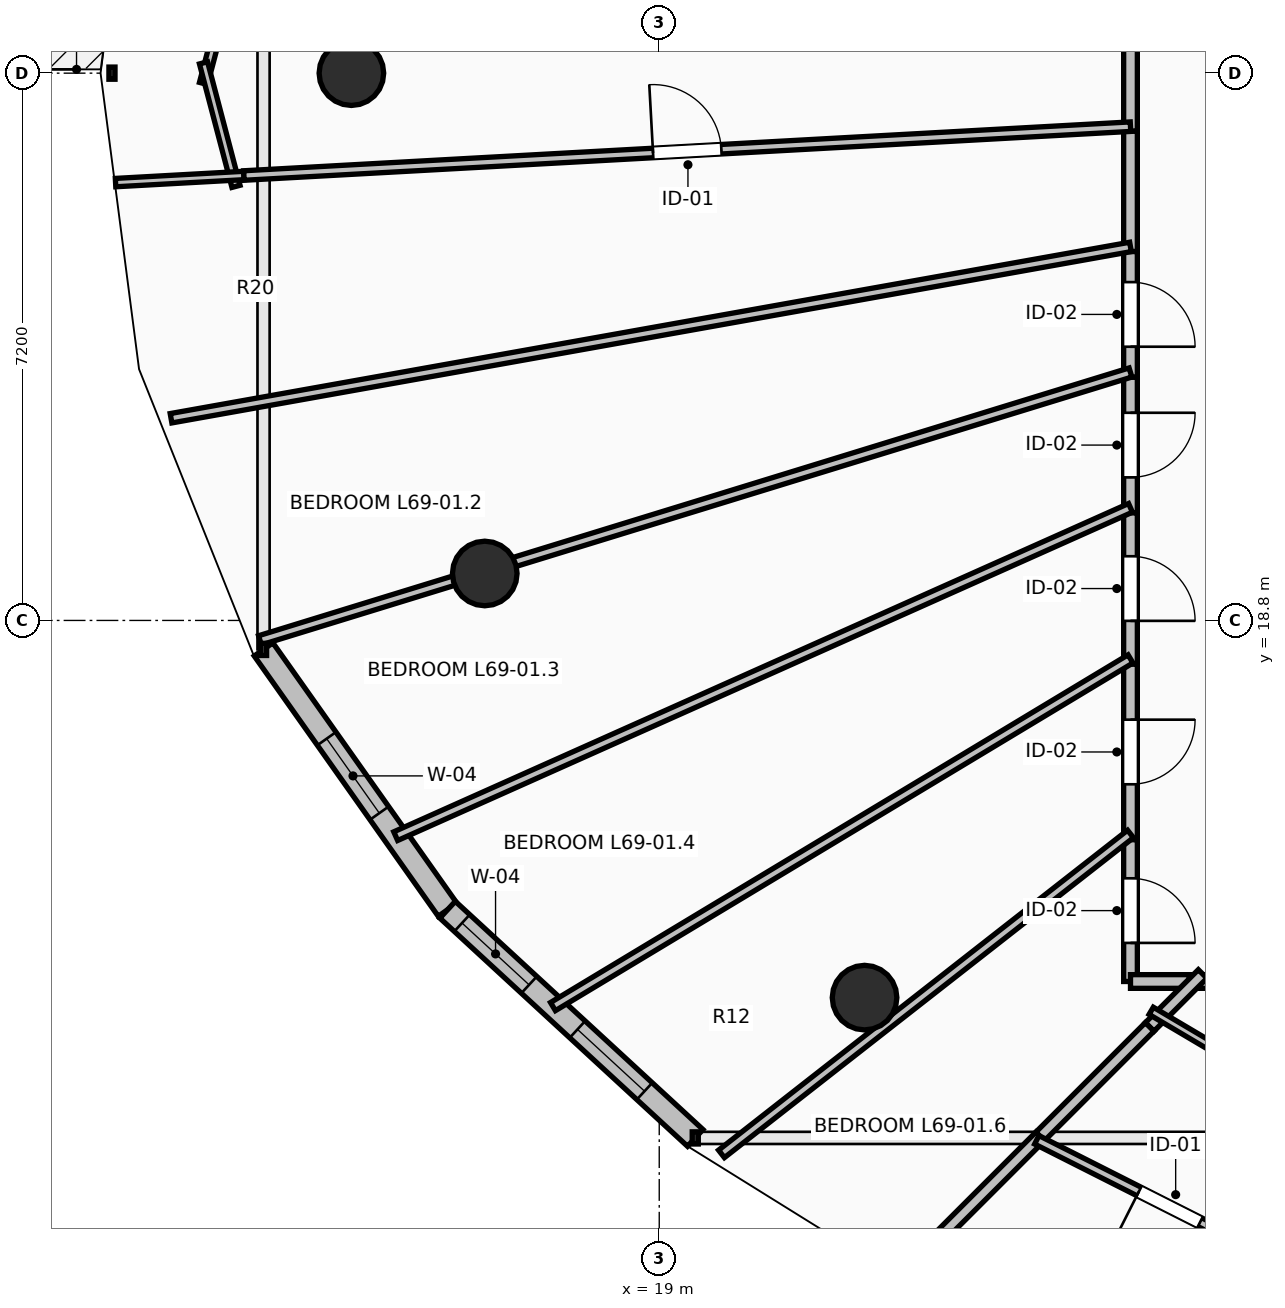
"""IFC4 building model, lengths in metres.
Left out: names, types, materials, properties, quantities, classifications, styles, units other than length and angle.
Written with IfcOpenShell. Run it as: python <this file> out.ifc"""

import sys

from ifc_helpers import new_model, si_unit, direction, frame, frame_2d, origin, origin_2d, place, context, subcontext, project, spatial, rectangle, circle, extrude, element, fill, save


model = new_model("IFC4")
c1 = context("Model", 3, precision=1e-05, world=origin(), true_north=direction((0.0, 1.0)))
c2 = subcontext(c1, "Body", "Model", "MODEL_VIEW")
j1 = project(units=[si_unit("LENGTHUNIT", "METRE"), si_unit("PLANEANGLEUNIT", "RADIAN")], contexts=[c1])
p1 = place(None, origin())
s1 = spatial("IfcSite", under=j1, at=p1, CompositionType="ELEMENT")
p2 = place(p1, origin())
s2 = spatial("IfcBuilding", under=s1, at=p2, CompositionType="ELEMENT")
p3 = place(p2, frame((0.0, 0.0, 255.55)))
s3 = spatial("IfcBuildingStorey", under=s2, at=p3, CompositionType="ELEMENT", Elevation=255.55)
for number, where, z_axis, x_axis in (
    (1, (14.95, 26.0, 0.0), (0.0, 0.0, 1.0), (-1.0, 0.0, 0.0)),
    (2, (16.705, 19.418, 0.0), (0.0, 0.0, 1.0), (-0.924, -0.383, 0.0)),
    (3, (21.701, 13.838, 0.0), (0.0, 0.0, 1.0), (-0.707, -0.707, 0.0)),
):
    element("IfcColumn", number, at=place(p3, frame(where, z_axis=z_axis, x_axis=x_axis)), inside=s3, PredefinedType="COLUMN", context=c2, shape_type="SweptSolid", body=[
        extrude(circle(Radius=0.425, at=origin_2d()), origin(), (0.0, 0.0, 1.0), 3.55),
    ])
p4 = place(p3, frame((13.794, 18.419, 0.0), z_axis=(0.0, 0.0, 1.0), x_axis=(0.577261247247, -0.816559521668, 0.0)))
e4 = element("IfcWall", 4, at=p4, inside=s3, PredefinedType="STANDARD", context=c2, shape_type="SweptSolid", body=[
    extrude(rectangle(XDim=4.194, YDim=0.3, at=frame_2d((2.097, 0.0))), origin(), (0.0, 0.0, 1.0), 3.29),
])
p5 = place(p4, frame((1.438, 0.0, 0.85)))
e5 = element("IfcOpeningElement", 5, at=p5, cuts=e4, PredefinedType="OPENING", context=c2, shape_type="SweptSolid", body=[
    extrude(rectangle(XDim=1.2, YDim=1.95, at=frame_2d((0.6, 0.975))), frame((0.0, 0.165, 0.0), z_axis=(0.0, -1.0, 0.0), x_axis=(1.0, 0.0, 0.0)), (0.0, 0.0, 1.0), 0.33),
])
p6 = place(p3, frame((16.216, 14.994, 0.0), z_axis=(0.0, 0.0, 1.0), x_axis=(0.735445373611, -0.677584018727, 0.0)))
e6 = element("IfcWall", 6, at=p6, inside=s3, PredefinedType="STANDARD", context=c2, shape_type="SweptSolid", body=[
    extrude(rectangle(XDim=4.43, YDim=0.3, at=frame_2d((2.215, 0.0))), origin(), (0.0, 0.0, 1.0), 3.29),
])
p7 = place(p6, frame((0.258, 0.0, 0.85)))
e7 = element("IfcOpeningElement", 7, at=p7, cuts=e6, PredefinedType="OPENING", context=c2, shape_type="SweptSolid", body=[
    extrude(rectangle(XDim=1.2, YDim=1.95, at=frame_2d((0.6, 0.975))), frame((0.0, 0.165, 0.0), z_axis=(0.0, -1.0, 0.0), x_axis=(1.0, 0.0, 0.0)), (0.0, 0.0, 1.0), 0.33),
])
p8 = place(p6, frame((2.323, 0.0, 0.85)))
e8 = element("IfcOpeningElement", 8, at=p8, cuts=e6, PredefinedType="OPENING", context=c2, shape_type="SweptSolid", body=[
    extrude(rectangle(XDim=1.2, YDim=1.95, at=frame_2d((0.6, 0.975))), frame((0.0, 0.165, 0.0), z_axis=(0.0, -1.0, 0.0), x_axis=(1.0, 0.0, 0.0)), (0.0, 0.0, 1.0), 0.33),
])
p9 = place(p3, frame((25.2, 28.599, 0.0), z_axis=(0.0, 0.0, 1.0), x_axis=(0.0, -1.0, 0.0)))
e9 = element("IfcWall", 9, at=p9, inside=s3, PredefinedType="PARTITIONING", context=c2, shape_type="SweptSolid", body=[
    extrude(rectangle(XDim=3.363, YDim=0.18, at=frame_2d((1.682, 0.0))), origin(), (0.0, 0.0, 1.0), 2.482),
])
p10 = place(p9, frame((1.181, 0.0, 0.0)))
e10 = element("IfcOpeningElement", 10, at=p10, cuts=e9, PredefinedType="OPENING", context=c2, shape_type="SweptSolid", body=[
    extrude(rectangle(XDim=1.0, YDim=2.15, at=frame_2d((0.5, 1.075))), frame((0.0, 0.105, 0.0), z_axis=(0.0, -1.0, 0.0), x_axis=(1.0, 0.0, 0.0)), (0.0, 0.0, 1.0), 0.21),
])
p11 = place(p3, frame((25.2, 25.236, 0.0), z_axis=(0.0, 0.0, 1.0), x_axis=(0.0, -1.0, 0.0)))
e11 = element("IfcWall", 11, at=p11, inside=s3, PredefinedType="PARTITIONING", context=c2, shape_type="SweptSolid", body=[
    extrude(rectangle(XDim=1.583, YDim=0.18, at=frame_2d((0.792, 0.0))), origin(), (0.0, 0.0, 1.0), 3.29),
])
p12 = place(p3, frame((25.2, 23.653, 0.0), z_axis=(0.0, 0.0, 1.0), x_axis=(0.0, -1.0, 0.0)))
e12 = element("IfcWall", 12, at=p12, inside=s3, PredefinedType="PARTITIONING", context=c2, shape_type="SweptSolid", body=[
    extrude(rectangle(XDim=1.654, YDim=0.18, at=frame_2d((0.827, 0.0))), origin(), (0.0, 0.0, 1.0), 3.29),
])
p13 = place(p12, frame((0.402, 0.0, 0.0)))
e13 = element("IfcOpeningElement", 13, at=p13, cuts=e12, PredefinedType="OPENING", context=c2, shape_type="SweptSolid", body=[
    extrude(rectangle(XDim=0.85, YDim=2.1, at=frame_2d((0.425, 1.05))), frame((0.0, 0.105, 0.0), z_axis=(0.0, -1.0, 0.0), x_axis=(1.0, 0.0, 0.0)), (0.0, 0.0, 1.0), 0.21),
])
p14 = place(p3, frame((25.2, 21.999, 0.0), z_axis=(0.0, 0.0, 1.0), x_axis=(0.0, -1.0, 0.0)))
e14 = element("IfcWall", 14, at=p14, inside=s3, PredefinedType="PARTITIONING", context=c2, shape_type="SweptSolid", body=[
    extrude(rectangle(XDim=1.784, YDim=0.18, at=frame_2d((0.892, 0.0))), origin(), (0.0, 0.0, 1.0), 3.29),
])
p15 = place(p14, frame((0.467, 0.0, 0.0)))
e15 = element("IfcOpeningElement", 15, at=p15, cuts=e14, PredefinedType="OPENING", context=c2, shape_type="SweptSolid", body=[
    extrude(rectangle(XDim=0.85, YDim=2.1, at=frame_2d((0.425, 1.05))), frame((0.0, 0.105, 0.0), z_axis=(0.0, -1.0, 0.0), x_axis=(1.0, 0.0, 0.0)), (0.0, 0.0, 1.0), 0.21),
])
p16 = place(p3, frame((25.2, 20.215, 0.0), z_axis=(0.0, 0.0, 1.0), x_axis=(0.0, -1.0, 0.0)))
e16 = element("IfcWall", 16, at=p16, inside=s3, PredefinedType="PARTITIONING", context=c2, shape_type="SweptSolid", body=[
    extrude(rectangle(XDim=1.991, YDim=0.18, at=frame_2d((0.996, 0.0))), origin(), (0.0, 0.0, 1.0), 3.29),
])
p17 = place(p16, frame((0.571, 0.0, 0.0)))
e17 = element("IfcOpeningElement", 17, at=p17, cuts=e16, PredefinedType="OPENING", context=c2, shape_type="SweptSolid", body=[
    extrude(rectangle(XDim=0.85, YDim=2.1, at=frame_2d((0.425, 1.05))), frame((0.0, 0.105, 0.0), z_axis=(0.0, -1.0, 0.0), x_axis=(1.0, 0.0, 0.0)), (0.0, 0.0, 1.0), 0.21),
])
p18 = place(p3, frame((25.2, 18.224, 0.0), z_axis=(0.0, 0.0, 1.0), x_axis=(0.0, -1.0, 0.0)))
e18 = element("IfcWall", 18, at=p18, inside=s3, PredefinedType="PARTITIONING", context=c2, shape_type="SweptSolid", body=[
    extrude(rectangle(XDim=2.309, YDim=0.18, at=frame_2d((1.155, 0.0))), origin(), (0.0, 0.0, 1.0), 2.482),
])
p19 = place(p18, frame((0.729, 0.0, 0.0)))
e19 = element("IfcOpeningElement", 19, at=p19, cuts=e18, PredefinedType="OPENING", context=c2, shape_type="SweptSolid", body=[
    extrude(rectangle(XDim=0.85, YDim=2.1, at=frame_2d((0.425, 1.05))), frame((0.0, 0.105, 0.0), z_axis=(0.0, -1.0, 0.0), x_axis=(1.0, 0.0, 0.0)), (0.0, 0.0, 1.0), 0.21),
])
p20 = place(p3, frame((25.2, 15.915, 0.0), z_axis=(0.0, 0.0, 1.0), x_axis=(0.0, -1.0, 0.0)))
e20 = element("IfcWall", 20, at=p20, inside=s3, PredefinedType="PARTITIONING", context=c2, shape_type="SweptSolid", body=[
    extrude(rectangle(XDim=1.865, YDim=0.18, at=frame_2d((0.933, 0.0))), origin(), (0.0, 0.0, 1.0), 2.482),
])
p21 = place(p20, frame((0.508, 0.0, 0.0)))
e21 = element("IfcOpeningElement", 21, at=p21, cuts=e20, PredefinedType="OPENING", context=c2, shape_type="SweptSolid", body=[
    extrude(rectangle(XDim=0.85, YDim=2.1, at=frame_2d((0.425, 1.05))), frame((0.0, 0.105, 0.0), z_axis=(0.0, -1.0, 0.0), x_axis=(1.0, 0.0, 0.0)), (0.0, 0.0, 1.0), 0.21),
])
p22 = place(p3, frame((25.2, 14.05, 0.0), z_axis=(0.0, 0.0, 1.0), x_axis=(1.0, 0.0, 0.0)))
e22 = element("IfcWall", 22, at=p22, inside=s3, PredefinedType="PARTITIONING", context=c2, shape_type="SweptSolid", body=[
    extrude(rectangle(XDim=0.91, YDim=0.18, at=frame_2d((0.455, 0.0))), origin(), (0.0, 0.0, 1.0), 3.022),
])
p23 = place(p3, frame((25.97, 14.05, 0.0), z_axis=(0.0, 0.0, 1.0), x_axis=(1.0, 0.0, 0.0)))
e23 = element("IfcWall", 23, at=p23, inside=s3, PredefinedType="PARTITIONING", context=c2, shape_type="SweptSolid", body=[
    extrude(rectangle(XDim=4.124, YDim=0.18, at=frame_2d((2.062, 0.0))), origin(), (0.0, 0.0, 1.0), 2.482),
])
p24 = place(p3, frame((14.203, 30.418, 0.0), z_axis=(0.0, 0.0, 1.0), x_axis=(-0.254460123068, -0.967083267236, 0.0)))
e24 = element("IfcWall", 24, at=p24, inside=s3, PredefinedType="PARTITIONING", context=c2, shape_type="SweptSolid", body=[
    extrude(rectangle(XDim=4.709, YDim=0.11, at=frame_2d((2.354, 0.0))), origin(), (0.0, 0.0, 1.0), 3.29),
])
p25 = place(p24, frame((1.904, 0.0, 0.0)))
e25 = element("IfcOpeningElement", 25, at=p25, cuts=e24, PredefinedType="OPENING", context=c2, shape_type="SweptSolid", body=[
    extrude(rectangle(XDim=0.9, YDim=2.1, at=frame_2d((0.45, 1.05))), frame((0.0, 0.07, 0.0), z_axis=(0.0, -1.0, 0.0), x_axis=(1.0, 0.0, 0.0)), (0.0, 0.0, 1.0), 0.14),
])
p26 = place(p3, frame((13.004, 26.135, 0.0), z_axis=(0.0, 0.0, 1.0), x_axis=(0.254278727694, -0.967130978018, 0.0)))
e26 = element("IfcWall", 26, at=p26, inside=s3, PredefinedType="PARTITIONING", context=c2, shape_type="SweptSolid", body=[
    extrude(rectangle(XDim=1.68, YDim=0.11, at=frame_2d((0.84, 0.0))), origin(), (0.0, 0.0, 1.0), 3.29),
])
p27 = place(p3, frame((13.536, 24.654, 0.0), z_axis=(0.0, 0.0, 1.0), x_axis=(-0.998470551828, -0.055286138695, 0.0)))
e27 = element("IfcWall", 27, at=p27, inside=s3, PredefinedType="PARTITIONING", context=c2, shape_type="SweptSolid", body=[
    extrude(rectangle(XDim=1.691, YDim=0.11, at=frame_2d((0.846, 0.0))), origin(), (0.0, 0.0, 1.0), 3.29),
])
p28 = place(p3, frame((13.536, 24.653, 0.0), z_axis=(0.0, 0.0, 1.0), x_axis=(0.998485968097, 0.055007013313, 0.0)))
e28 = element("IfcWall", 28, at=p28, inside=s3, PredefinedType="PARTITIONING", context=c2, shape_type="SweptSolid", body=[
    extrude(rectangle(XDim=11.682, YDim=0.125, at=frame_2d((5.841, 0.0))), origin(), (0.0, 0.0, 1.0), 2.874),
])
p29 = place(p28, frame((5.391, 0.0, 0.0)))
e29 = element("IfcOpeningElement", 29, at=p29, cuts=e28, PredefinedType="OPENING", context=c2, shape_type="SweptSolid", body=[
    extrude(rectangle(XDim=0.9, YDim=2.1, at=frame_2d((0.45, 1.05))), frame((0.0, 0.077, 0.0), z_axis=(0.0, -1.0, 0.0), x_axis=(1.0, 0.0, 0.0)), (0.0, 0.0, 1.0), 0.155),
])
p30 = place(p3, frame((12.577, 21.46, 0.0), z_axis=(0.0, 0.0, 1.0), x_axis=(0.984427104809, 0.175793274383, 0.0)))
e30 = element("IfcWall", 30, at=p30, inside=s3, PredefinedType="PARTITIONING", context=c2, shape_type="SweptSolid", body=[
    extrude(rectangle(XDim=12.823, YDim=0.125, at=frame_2d((6.411, 0.0))), origin(), (0.0, 0.0, 1.0), 2.874),
])
p31 = place(p3, frame((13.747, 18.539, 0.0), z_axis=(0.0, 0.0, 1.0), x_axis=(0.955802794564, 0.294008533725, 0.0)))
e31 = element("IfcWall", 31, at=p31, inside=s3, PredefinedType="PARTITIONING", context=c2, shape_type="SweptSolid", body=[
    extrude(rectangle(XDim=11.982, YDim=0.125, at=frame_2d((5.991, 0.0))), origin(), (0.0, 0.0, 1.0), 2.482),
])
p32 = place(p3, frame((15.533, 15.962, 0.0), z_axis=(0.0, 0.0, 1.0), x_axis=(0.913015836792, 0.407924112756, 0.0)))
e32 = element("IfcWall", 32, at=p32, inside=s3, PredefinedType="PARTITIONING", context=c2, shape_type="SweptSolid", body=[
    extrude(rectangle(XDim=10.588, YDim=0.125, at=frame_2d((5.294, 0.0))), origin(), (0.0, 0.0, 1.0), 2.482),
])
p33 = place(p3, frame((17.602, 13.72, 0.0), z_axis=(0.0, 0.0, 1.0), x_axis=(0.856734134601, 0.515758298633, 0.0)))
e33 = element("IfcWall", 33, at=p33, inside=s3, PredefinedType="PARTITIONING", context=c2, shape_type="SweptSolid", body=[
    extrude(rectangle(XDim=8.868, YDim=0.125, at=frame_2d((4.434, 0.0))), origin(), (0.0, 0.0, 1.0), 2.482),
])
p34 = place(p3, frame((19.819, 11.782, 0.0), z_axis=(0.0, 0.0, 1.0), x_axis=(0.78765580417, 0.61611552014, 0.0)))
e34 = element("IfcWall", 34, at=p34, inside=s3, PredefinedType="PARTITIONING", context=c2, shape_type="SweptSolid", body=[
    extrude(rectangle(XDim=6.832, YDim=0.125, at=frame_2d((3.416, 0.0))), origin(), (0.0, 0.0, 1.0), 2.482),
])
p35 = place(p3, frame((22.263, 10.263, 0.0), z_axis=(0.0, 0.0, 1.0), x_axis=(0.707106781187, 0.707106781187, 0.0)))
e35 = element("IfcWall", 35, at=p35, inside=s3, PredefinedType="PARTITIONING", context=c2, shape_type="SweptSolid", body=[
    extrude(rectangle(XDim=2.473, YDim=0.16, at=frame_2d((1.237, 0.0))), origin(), (0.0, 0.0, 1.0), 3.29),
])
p36 = place(p3, frame((25.452, 13.452, 0.0), z_axis=(0.0, 0.0, 1.0), x_axis=(0.707106781187, 0.707106781187, 0.0)))
e36 = element("IfcWall", 36, at=p36, inside=s3, PredefinedType="PARTITIONING", context=c2, shape_type="SweptSolid", body=[
    extrude(rectangle(XDim=0.986, YDim=0.16, at=frame_2d((0.493, 0.0))), origin(), (0.0, 0.0, 1.0), 3.022),
])
p37 = place(p3, frame((24.012, 12.012, 0.0), z_axis=(0.0, 0.0, 1.0), x_axis=(0.707106781187, 0.707106781187, 0.0)))
e37 = element("IfcWall", 37, at=p37, inside=s3, PredefinedType="PARTITIONING", context=c2, shape_type="SweptSolid", body=[
    extrude(rectangle(XDim=2.036, YDim=0.16, at=frame_2d((1.018, 0.0))), origin(), (0.0, 0.0, 1.0), 2.874),
])
p38 = place(p3, frame((27.459, 10.203, 0.0), z_axis=(0.0, 0.0, 1.0), x_axis=(-0.892559828496, 0.450928988374, 0.0)))
e38 = element("IfcWall", 38, at=p38, inside=s3, PredefinedType="PARTITIONING", context=c2, shape_type="SweptSolid", body=[
    extrude(rectangle(XDim=3.912, YDim=0.125, at=frame_2d((1.956, 0.0))), origin(), (0.0, 0.0, 1.0), 3.29),
])
p39 = place(p38, frame((1.506, 0.0, 0.0)))
e39 = element("IfcOpeningElement", 39, at=p39, cuts=e38, PredefinedType="OPENING", context=c2, shape_type="SweptSolid", body=[
    extrude(rectangle(XDim=0.9, YDim=2.1, at=frame_2d((0.45, 1.05))), frame((0.0, 0.077, 0.0), z_axis=(0.0, -1.0, 0.0), x_axis=(1.0, 0.0, 0.0)), (0.0, 0.0, 1.0), 0.155),
])
p40 = place(p3, frame((25.472, 13.664, 0.0), z_axis=(0.0, 0.0, 1.0), x_axis=(0.860546797705, -0.509371386082, 0.0)))
e40 = element("IfcWall", 40, at=p40, inside=s3, PredefinedType="PARTITIONING", context=c2, shape_type="SweptSolid", body=[
    extrude(rectangle(XDim=2.485, YDim=0.11, at=frame_2d((1.242, 0.0))), origin(), (0.0, 0.0, 1.0), 3.022),
])
p41 = place(p5, origin())
e41 = element("IfcWindow", 41, at=p41, inside=s3, PartitioningType="SINGLE_PANEL", PredefinedType="WINDOW", context=c2, shape_type="SweptSolid", body=[
    extrude(rectangle(XDim=1.2, YDim=1.95, at=frame_2d((0.6, 0.975))), frame((0.0, 0.03, 0.0), z_axis=(0.0, -1.0, 0.0), x_axis=(1.0, 0.0, 0.0)), (0.0, 0.0, 1.0), 0.06),
])
fill(e5, e41)
p42 = place(p7, origin())
e42 = element("IfcWindow", 42, at=p42, inside=s3, PartitioningType="SINGLE_PANEL", PredefinedType="WINDOW", context=c2, shape_type="SweptSolid", body=[
    extrude(rectangle(XDim=1.2, YDim=1.95, at=frame_2d((0.6, 0.975))), frame((0.0, 0.03, 0.0), z_axis=(0.0, -1.0, 0.0), x_axis=(1.0, 0.0, 0.0)), (0.0, 0.0, 1.0), 0.06),
])
fill(e7, e42)
p43 = place(p8, origin())
e43 = element("IfcWindow", 43, at=p43, inside=s3, PartitioningType="SINGLE_PANEL", PredefinedType="WINDOW", context=c2, shape_type="SweptSolid", body=[
    extrude(rectangle(XDim=1.2, YDim=1.95, at=frame_2d((0.6, 0.975))), frame((0.0, 0.03, 0.0), z_axis=(0.0, -1.0, 0.0), x_axis=(1.0, 0.0, 0.0)), (0.0, 0.0, 1.0), 0.06),
])
fill(e8, e43)
p44 = place(p29, origin())
e44 = element("IfcDoor", 44, at=p44, inside=s3, OperationType="SINGLE_SWING_LEFT", PredefinedType="DOOR", context=c2, shape_type="SweptSolid", body=[
    extrude(rectangle(XDim=0.9, YDim=2.1, at=frame_2d((0.45, 1.05))), frame((0.0, 0.025, 0.0), z_axis=(0.0, -1.0, 0.0), x_axis=(1.0, 0.0, 0.0)), (0.0, 0.0, 1.0), 0.05),
])
fill(e29, e44)
p45 = place(p39, origin())
e45 = element("IfcDoor", 45, at=p45, inside=s3, OperationType="SINGLE_SWING_RIGHT", PredefinedType="DOOR", context=c2, shape_type="SweptSolid", body=[
    extrude(rectangle(XDim=0.9, YDim=2.1, at=frame_2d((0.45, 1.05))), frame((0.0, 0.025, 0.0), z_axis=(0.0, -1.0, 0.0), x_axis=(1.0, 0.0, 0.0)), (0.0, 0.0, 1.0), 0.05),
])
fill(e39, e45)
p46 = place(p13, origin())
e46 = element("IfcDoor", 46, at=p46, inside=s3, OperationType="SINGLE_SWING_RIGHT", PredefinedType="DOOR", context=c2, shape_type="SweptSolid", body=[
    extrude(rectangle(XDim=0.85, YDim=2.1, at=frame_2d((0.425, 1.05))), frame((0.0, 0.025, 0.0), z_axis=(0.0, -1.0, 0.0), x_axis=(1.0, 0.0, 0.0)), (0.0, 0.0, 1.0), 0.05),
])
fill(e13, e46)
p47 = place(p15, origin())
e47 = element("IfcDoor", 47, at=p47, inside=s3, OperationType="SINGLE_SWING_LEFT", PredefinedType="DOOR", context=c2, shape_type="SweptSolid", body=[
    extrude(rectangle(XDim=0.85, YDim=2.1, at=frame_2d((0.425, 1.05))), frame((0.0, 0.025, 0.0), z_axis=(0.0, -1.0, 0.0), x_axis=(1.0, 0.0, 0.0)), (0.0, 0.0, 1.0), 0.05),
])
fill(e15, e47)
p48 = place(p17, origin())
e48 = element("IfcDoor", 48, at=p48, inside=s3, OperationType="SINGLE_SWING_RIGHT", PredefinedType="DOOR", context=c2, shape_type="SweptSolid", body=[
    extrude(rectangle(XDim=0.85, YDim=2.1, at=frame_2d((0.425, 1.05))), frame((0.0, 0.025, 0.0), z_axis=(0.0, -1.0, 0.0), x_axis=(1.0, 0.0, 0.0)), (0.0, 0.0, 1.0), 0.05),
])
fill(e17, e48)
p49 = place(p19, origin())
e49 = element("IfcDoor", 49, at=p49, inside=s3, OperationType="SINGLE_SWING_LEFT", PredefinedType="DOOR", context=c2, shape_type="SweptSolid", body=[
    extrude(rectangle(XDim=0.85, YDim=2.1, at=frame_2d((0.425, 1.05))), frame((0.0, 0.025, 0.0), z_axis=(0.0, -1.0, 0.0), x_axis=(1.0, 0.0, 0.0)), (0.0, 0.0, 1.0), 0.05),
])
fill(e19, e49)
p50 = place(p21, origin())
e50 = element("IfcDoor", 50, at=p50, inside=s3, OperationType="SINGLE_SWING_RIGHT", PredefinedType="DOOR", context=c2, shape_type="SweptSolid", body=[
    extrude(rectangle(XDim=0.85, YDim=2.1, at=frame_2d((0.425, 1.05))), frame((0.0, 0.025, 0.0), z_axis=(0.0, -1.0, 0.0), x_axis=(1.0, 0.0, 0.0)), (0.0, 0.0, 1.0), 0.05),
])
fill(e21, e50)
save(model, sys.argv[1])
